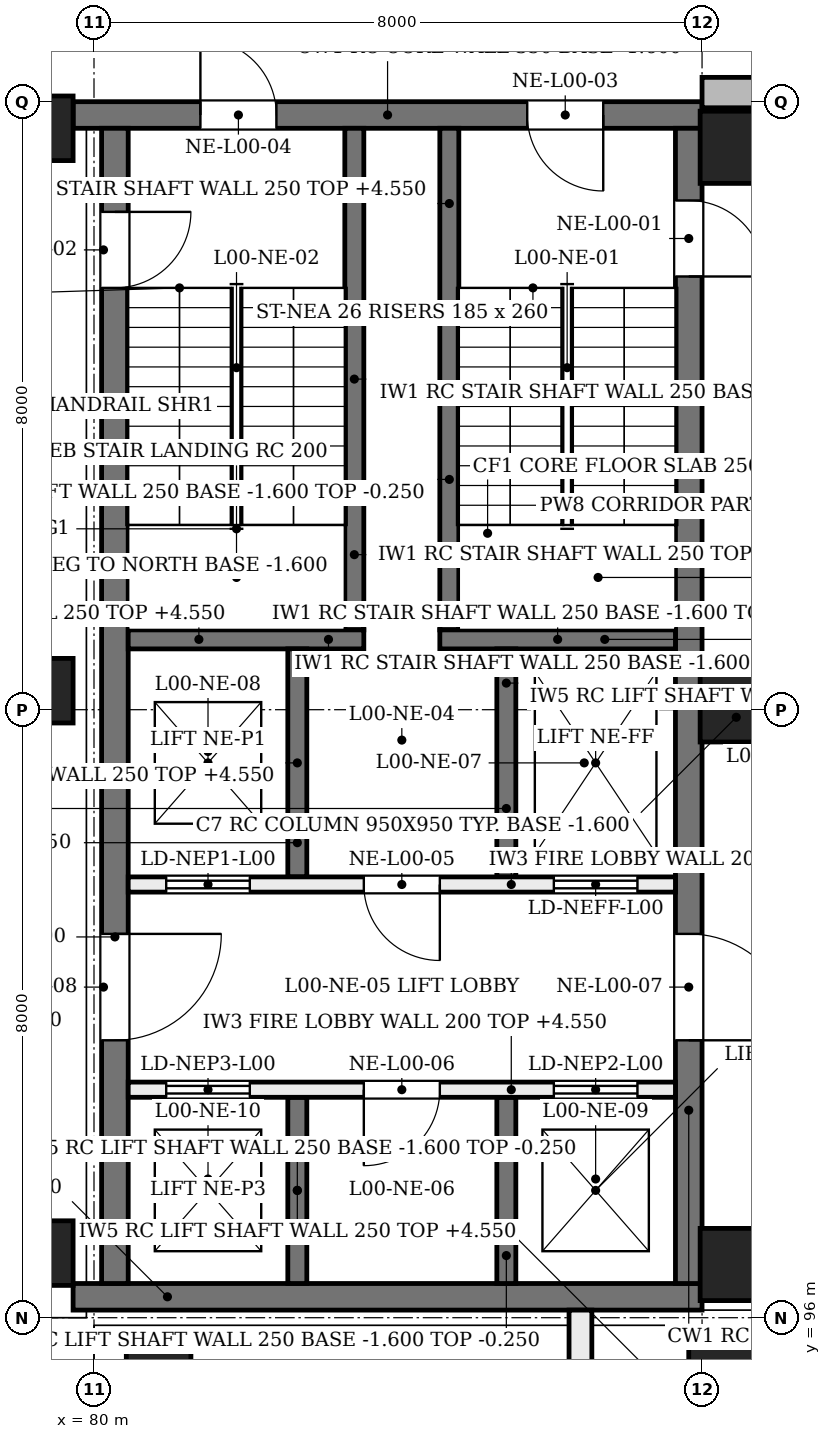
"""IFC4 building model, lengths in metres.
Left out: names, types, materials, properties, quantities, classifications, styles, units other than length and angle.
Written with IfcOpenShell. Run it as: python <this file> out.ifc"""

import sys

from ifc_helpers import new_model, si_unit, direction, frame, frame_2d, origin, origin_2d, place, context, subcontext, project, spatial, rectangle, extrude, element, fill, save


model = new_model("IFC4")
c1 = context("Model", 3, precision=1e-05, world=origin(), true_north=direction((0.0, 1.0)))
c2 = subcontext(c1, "Body", "Model", "MODEL_VIEW")
j1 = project(units=[si_unit("LENGTHUNIT", "METRE"), si_unit("PLANEANGLEUNIT", "RADIAN")], contexts=[c1])
p1 = place(None, origin())
s1 = spatial("IfcSite", under=j1, at=p1, CompositionType="ELEMENT")
p2 = place(p1, origin())
s2 = spatial("IfcBuilding", under=s1, at=p2, CompositionType="ELEMENT")
p3 = place(p2, origin())
s3 = spatial("IfcBuildingStorey", under=s2, at=p3, CompositionType="ELEMENT", Elevation=0.0)
p4 = place(p3, frame((79.725, 96.275, -1.6), z_axis=(0.0, 0.0, 1.0), x_axis=(1.0, 0.0, 0.0)))
e1 = element("IfcWall", 1, at=p4, inside=s3, PredefinedType="SHEAR", context=c2, shape_type="SweptSolid", body=[
    extrude(rectangle(XDim=8.275, YDim=0.35, at=frame_2d((4.137, 0.0))), origin(), (0.0, 0.0, 1.0), 6.18),
])
p5 = place(p3, frame((79.725, 111.825, -1.6), z_axis=(0.0, 0.0, 1.0), x_axis=(1.0, 0.0, 0.0)))
e2 = element("IfcWall", 2, at=p5, inside=s3, PredefinedType="SHEAR", context=c2, shape_type="SweptSolid", body=[
    extrude(rectangle(XDim=8.275, YDim=0.35, at=frame_2d((4.137, 0.0))), origin(), (0.0, 0.0, 1.0), 6.18),
])
p6 = place(p5, frame((5.975, 0.0, 1.6)))
e3 = element("IfcOpeningElement", 3, at=p6, cuts=e2, PredefinedType="OPENING", context=c2, shape_type="SweptSolid", body=[
    extrude(rectangle(XDim=1.0, YDim=2.1, at=frame_2d((0.5, 1.05))), frame((0.0, 0.185, 0.0), z_axis=(0.0, -1.0, 0.0), x_axis=(1.0, 0.0, 0.0)), (0.0, 0.0, 1.0), 0.37),
])
p7 = place(p5, frame((1.675, 0.0, 1.6)))
e4 = element("IfcOpeningElement", 4, at=p7, cuts=e2, PredefinedType="OPENING", context=c2, shape_type="SweptSolid", body=[
    extrude(rectangle(XDim=1.0, YDim=2.1, at=frame_2d((0.5, 1.05))), frame((0.0, 0.185, 0.0), z_axis=(0.0, -1.0, 0.0), x_axis=(1.0, 0.0, 0.0)), (0.0, 0.0, 1.0), 0.37),
])
p8 = place(p3, frame((80.275, 96.45, -1.6), z_axis=(0.0, 0.0, 1.0), x_axis=(0.0, 1.0, 0.0)))
e5 = element("IfcWall", 5, at=p8, inside=s3, PredefinedType="SHEAR", context=c2, shape_type="SweptSolid", body=[
    extrude(rectangle(XDim=15.2, YDim=0.35, at=frame_2d((7.6, 0.0))), origin(), (0.0, 0.0, 1.0), 6.18),
])
p9 = place(p8, frame((13.1, 0.0, 1.6)))
e6 = element("IfcOpeningElement", 6, at=p9, cuts=e5, PredefinedType="OPENING", context=c2, shape_type="SweptSolid", body=[
    extrude(rectangle(XDim=1.0, YDim=2.1, at=frame_2d((0.5, 1.05))), frame((0.0, 0.185, 0.0), z_axis=(0.0, -1.0, 0.0), x_axis=(1.0, 0.0, 0.0)), (0.0, 0.0, 1.0), 0.37),
])
p10 = place(p8, frame((3.2, 0.0, 1.6)))
e7 = element("IfcOpeningElement", 7, at=p10, cuts=e5, PredefinedType="OPENING", context=c2, shape_type="SweptSolid", body=[
    extrude(rectangle(XDim=1.4, YDim=2.1, at=frame_2d((0.7, 1.05))), frame((0.0, 0.185, 0.0), z_axis=(0.0, -1.0, 0.0), x_axis=(1.0, 0.0, 0.0)), (0.0, 0.0, 1.0), 0.37),
])
p11 = place(p3, frame((87.825, 96.45, -1.6), z_axis=(0.0, 0.0, 1.0), x_axis=(0.0, 1.0, 0.0)))
e8 = element("IfcWall", 8, at=p11, inside=s3, PredefinedType="SHEAR", context=c2, shape_type="SweptSolid", body=[
    extrude(rectangle(XDim=15.2, YDim=0.35, at=frame_2d((7.6, 0.0))), origin(), (0.0, 0.0, 1.0), 6.18),
])
p12 = place(p11, frame((13.25, 0.0, 1.6)))
e9 = element("IfcOpeningElement", 9, at=p12, cuts=e8, PredefinedType="OPENING", context=c2, shape_type="SweptSolid", body=[
    extrude(rectangle(XDim=1.0, YDim=2.1, at=frame_2d((0.5, 1.05))), frame((0.0, 0.185, 0.0), z_axis=(0.0, -1.0, 0.0), x_axis=(1.0, 0.0, 0.0)), (0.0, 0.0, 1.0), 0.37),
])
p13 = place(p11, frame((3.2, 0.0, 1.6)))
e10 = element("IfcOpeningElement", 10, at=p13, cuts=e8, PredefinedType="OPENING", context=c2, shape_type="SweptSolid", body=[
    extrude(rectangle(XDim=1.4, YDim=2.1, at=frame_2d((0.7, 1.05))), frame((0.0, 0.185, 0.0), z_axis=(0.0, -1.0, 0.0), x_axis=(1.0, 0.0, 0.0)), (0.0, 0.0, 1.0), 0.37),
])
for number, where, z_axis, x_axis in (
    (11, (88.45, 96.7, -1.6), (0.0, 0.0, 1.0), (1.0, 0.0, 0.0)),
    (12, (88.45, 104.05, -1.6), (0.0, 0.0, 1.0), (1.0, 0.0, 0.0)),
    (13, (88.45, 111.4, -1.6), (0.0, 0.0, 1.0), (1.0, 0.0, 0.0)),
):
    element("IfcColumn", number, at=place(p3, frame(where, z_axis=z_axis, x_axis=x_axis)), inside=s3, PredefinedType="COLUMN", context=c2, shape_type="SweptSolid", body=[
        extrude(rectangle(XDim=0.95, YDim=0.95, at=origin_2d()), origin(), (0.0, 0.0, 1.0), 6.4),
    ])
for number, where, z_axis, x_axis in (
    (14, (79.3, 96.267, -1.6), (0.0, 0.204, 0.979), (-1.0, 0.0, 0.0)),
    (15, (79.3, 103.667, -1.6), (0.0, 0.204, 0.979), (-1.0, 0.0, 0.0)),
    (16, (79.3, 111.067, -1.6), (0.0, 0.204, 0.979), (-1.0, 0.0, 0.0)),
    (17, (80.267, 95.3, -1.6), (0.204, 0.0, 0.979), (0.0, 1.0, 0.0)),
    (18, (87.667, 95.3, -1.6), (0.204, 0.0, 0.979), (0.0, 1.0, 0.0)),
):
    element("IfcColumn", number, at=place(p3, frame(where, z_axis=z_axis, x_axis=x_axis)), inside=s3, PredefinedType="COLUMN", context=c2, shape_type="SweptSolid", body=[
        extrude(rectangle(XDim=0.85, YDim=0.85, at=origin_2d()), origin(), (0.0, 0.0, 1.0), 6.538),
    ])
p14 = place(p3, frame((88.0, 112.12, 0.0), z_axis=(0.0, 0.0, 1.0), x_axis=(1.0, 0.0, 0.0)))
e19 = element("IfcWall", 19, at=p14, inside=s3, PredefinedType="SOLIDWALL", context=c2, shape_type="SweptSolid", body=[
    extrude(rectangle(XDim=8.0, YDim=0.4, at=frame_2d((4.0, 0.0))), origin(), (0.0, 0.0, 1.0), 3.9),
])
p15 = place(p14, frame((0.733, 0.0, 1.9)))
e20 = element("IfcOpeningElement", 20, at=p15, cuts=e19, PredefinedType="OPENING", context=c2, shape_type="SweptSolid", body=[
    extrude(rectangle(XDim=1.2, YDim=1.5, at=frame_2d((0.6, 0.75))), frame((0.0, 0.21, 0.0), z_axis=(0.0, -1.0, 0.0), x_axis=(1.0, 0.0, 0.0)), (0.0, 0.0, 1.0), 0.42),
])
p16 = place(p14, frame((3.4, 0.0, 1.9)))
e21 = element("IfcOpeningElement", 21, at=p16, cuts=e19, PredefinedType="OPENING", context=c2, shape_type="SweptSolid", body=[
    extrude(rectangle(XDim=1.2, YDim=1.5, at=frame_2d((0.6, 0.75))), frame((0.0, 0.21, 0.0), z_axis=(0.0, -1.0, 0.0), x_axis=(1.0, 0.0, 0.0)), (0.0, 0.0, 1.0), 0.42),
])
p17 = place(p14, frame((6.067, 0.0, 1.9)))
e22 = element("IfcOpeningElement", 22, at=p17, cuts=e19, PredefinedType="OPENING", context=c2, shape_type="SweptSolid", body=[
    extrude(rectangle(XDim=1.2, YDim=1.5, at=frame_2d((0.6, 0.75))), frame((0.0, 0.21, 0.0), z_axis=(0.0, -1.0, 0.0), x_axis=(1.0, 0.0, 0.0)), (0.0, 0.0, 1.0), 0.42),
])
p18 = place(p3, frame((84.675, 111.65, 0.0), z_axis=(0.0, 0.0, 1.0), x_axis=(0.0, -1.0, 0.0)))
e23 = element("IfcWall", 23, at=p18, inside=s3, PredefinedType="SOLIDWALL", context=c2, shape_type="SweptSolid", body=[
    extrude(rectangle(XDim=6.6, YDim=0.25, at=frame_2d((3.3, 0.0))), origin(), (0.0, 0.0, 1.0), 4.55),
])
p19 = place(p3, frame((84.675, 111.65, -1.6), z_axis=(0.0, 0.0, 1.0), x_axis=(0.0, -1.0, 0.0)))
e24 = element("IfcWall", 24, at=p19, inside=s3, PredefinedType="SOLIDWALL", context=c2, shape_type="SweptSolid", body=[
    extrude(rectangle(XDim=6.6, YDim=0.25, at=frame_2d((3.3, 0.0))), origin(), (0.0, 0.0, 1.0), 1.35),
])
p20 = place(p3, frame((83.425, 111.65, 0.0), z_axis=(0.0, 0.0, 1.0), x_axis=(0.0, -1.0, 0.0)))
e25 = element("IfcWall", 25, at=p20, inside=s3, PredefinedType="SOLIDWALL", context=c2, shape_type="SweptSolid", body=[
    extrude(rectangle(XDim=6.6, YDim=0.25, at=frame_2d((3.3, 0.0))), origin(), (0.0, 0.0, 1.0), 4.55),
])
p21 = place(p3, frame((83.425, 111.65, -1.6), z_axis=(0.0, 0.0, 1.0), x_axis=(0.0, -1.0, 0.0)))
e26 = element("IfcWall", 26, at=p21, inside=s3, PredefinedType="SOLIDWALL", context=c2, shape_type="SweptSolid", body=[
    extrude(rectangle(XDim=6.6, YDim=0.25, at=frame_2d((3.3, 0.0))), origin(), (0.0, 0.0, 1.0), 1.35),
])
p22 = place(p3, frame((87.65, 104.925, 0.0), z_axis=(0.0, 0.0, 1.0), x_axis=(-1.0, 0.0, 0.0)))
e27 = element("IfcWall", 27, at=p22, inside=s3, PredefinedType="SOLIDWALL", context=c2, shape_type="SweptSolid", body=[
    extrude(rectangle(XDim=3.1, YDim=0.25, at=frame_2d((1.55, 0.0))), origin(), (0.0, 0.0, 1.0), 4.55),
])
p23 = place(p3, frame((87.65, 104.925, -1.6), z_axis=(0.0, 0.0, 1.0), x_axis=(-1.0, 0.0, 0.0)))
e28 = element("IfcWall", 28, at=p23, inside=s3, PredefinedType="SOLIDWALL", context=c2, shape_type="SweptSolid", body=[
    extrude(rectangle(XDim=3.1, YDim=0.25, at=frame_2d((1.55, 0.0))), origin(), (0.0, 0.0, 1.0), 1.35),
])
p24 = place(p3, frame((83.55, 104.925, 0.0), z_axis=(0.0, 0.0, 1.0), x_axis=(-1.0, 0.0, 0.0)))
e29 = element("IfcWall", 29, at=p24, inside=s3, PredefinedType="SOLIDWALL", context=c2, shape_type="SweptSolid", body=[
    extrude(rectangle(XDim=3.1, YDim=0.25, at=frame_2d((1.55, 0.0))), origin(), (0.0, 0.0, 1.0), 4.55),
])
p25 = place(p3, frame((83.55, 104.925, -1.6), z_axis=(0.0, 0.0, 1.0), x_axis=(-1.0, 0.0, 0.0)))
e30 = element("IfcWall", 30, at=p25, inside=s3, PredefinedType="SOLIDWALL", context=c2, shape_type="SweptSolid", body=[
    extrude(rectangle(XDim=3.1, YDim=0.25, at=frame_2d((1.55, 0.0))), origin(), (0.0, 0.0, 1.0), 1.35),
])
p26 = place(p3, frame((85.425, 104.8, 0.0), z_axis=(0.0, 0.0, 1.0), x_axis=(0.0, -1.0, 0.0)))
e31 = element("IfcWall", 31, at=p26, inside=s3, PredefinedType="SOLIDWALL", context=c2, shape_type="SweptSolid", body=[
    extrude(rectangle(XDim=3.0, YDim=0.25, at=frame_2d((1.5, 0.0))), origin(), (0.0, 0.0, 1.0), 4.55),
])
p27 = place(p3, frame((85.425, 104.8, -1.6), z_axis=(0.0, 0.0, 1.0), x_axis=(0.0, -1.0, 0.0)))
e32 = element("IfcWall", 32, at=p27, inside=s3, PredefinedType="SOLIDWALL", context=c2, shape_type="SweptSolid", body=[
    extrude(rectangle(XDim=3.0, YDim=0.25, at=frame_2d((1.5, 0.0))), origin(), (0.0, 0.0, 1.0), 1.35),
])
p28 = place(p3, frame((85.425, 98.9, 0.0), z_axis=(0.0, 0.0, 1.0), x_axis=(0.0, -1.0, 0.0)))
e33 = element("IfcWall", 33, at=p28, inside=s3, PredefinedType="SOLIDWALL", context=c2, shape_type="SweptSolid", body=[
    extrude(rectangle(XDim=2.45, YDim=0.25, at=frame_2d((1.225, 0.0))), origin(), (0.0, 0.0, 1.0), 4.55),
])
p29 = place(p3, frame((85.425, 98.9, -1.6), z_axis=(0.0, 0.0, 1.0), x_axis=(0.0, -1.0, 0.0)))
e34 = element("IfcWall", 34, at=p29, inside=s3, PredefinedType="SOLIDWALL", context=c2, shape_type="SweptSolid", body=[
    extrude(rectangle(XDim=2.45, YDim=0.25, at=frame_2d((1.225, 0.0))), origin(), (0.0, 0.0, 1.0), 1.35),
])
p30 = place(p3, frame((82.675, 104.8, 0.0), z_axis=(0.0, 0.0, 1.0), x_axis=(0.0, -1.0, 0.0)))
e35 = element("IfcWall", 35, at=p30, inside=s3, PredefinedType="SOLIDWALL", context=c2, shape_type="SweptSolid", body=[
    extrude(rectangle(XDim=3.0, YDim=0.25, at=frame_2d((1.5, 0.0))), origin(), (0.0, 0.0, 1.0), 4.55),
])
p31 = place(p3, frame((82.675, 104.8, -1.6), z_axis=(0.0, 0.0, 1.0), x_axis=(0.0, -1.0, 0.0)))
e36 = element("IfcWall", 36, at=p31, inside=s3, PredefinedType="SOLIDWALL", context=c2, shape_type="SweptSolid", body=[
    extrude(rectangle(XDim=3.0, YDim=0.25, at=frame_2d((1.5, 0.0))), origin(), (0.0, 0.0, 1.0), 1.35),
])
p32 = place(p3, frame((82.675, 98.9, 0.0), z_axis=(0.0, 0.0, 1.0), x_axis=(0.0, -1.0, 0.0)))
e37 = element("IfcWall", 37, at=p32, inside=s3, PredefinedType="SOLIDWALL", context=c2, shape_type="SweptSolid", body=[
    extrude(rectangle(XDim=2.45, YDim=0.25, at=frame_2d((1.225, 0.0))), origin(), (0.0, 0.0, 1.0), 4.55),
])
p33 = place(p3, frame((82.675, 98.9, -1.6), z_axis=(0.0, 0.0, 1.0), x_axis=(0.0, -1.0, 0.0)))
e38 = element("IfcWall", 38, at=p33, inside=s3, PredefinedType="SOLIDWALL", context=c2, shape_type="SweptSolid", body=[
    extrude(rectangle(XDim=2.45, YDim=0.25, at=frame_2d((1.225, 0.0))), origin(), (0.0, 0.0, 1.0), 1.35),
])
p34 = place(p3, frame((87.65, 101.7, 0.0), z_axis=(0.0, 0.0, 1.0), x_axis=(-1.0, 0.0, 0.0)))
e39 = element("IfcWall", 39, at=p34, inside=s3, PredefinedType="SOLIDWALL", context=c2, shape_type="SweptSolid", body=[
    extrude(rectangle(XDim=7.2, YDim=0.2, at=frame_2d((3.6, 0.0))), origin(), (0.0, 0.0, 1.0), 4.55),
])
p35 = place(p34, frame((0.5, 0.0, 0.0)))
e40 = element("IfcOpeningElement", 40, at=p35, cuts=e39, PredefinedType="OPENING", context=c2, shape_type="SweptSolid", body=[
    extrude(rectangle(XDim=1.1, YDim=2.1, at=frame_2d((0.55, 1.05))), frame((0.0, 0.11, 0.0), z_axis=(0.0, -1.0, 0.0), x_axis=(1.0, 0.0, 0.0)), (0.0, 0.0, 1.0), 0.22),
])
p36 = place(p34, frame((5.6, 0.0, 0.0)))
e41 = element("IfcOpeningElement", 41, at=p36, cuts=e39, PredefinedType="OPENING", context=c2, shape_type="SweptSolid", body=[
    extrude(rectangle(XDim=1.1, YDim=2.1, at=frame_2d((0.55, 1.05))), frame((0.0, 0.11, 0.0), z_axis=(0.0, -1.0, 0.0), x_axis=(1.0, 0.0, 0.0)), (0.0, 0.0, 1.0), 0.22),
])
p37 = place(p34, frame((3.1, 0.0, 0.0)))
e42 = element("IfcOpeningElement", 42, at=p37, cuts=e39, PredefinedType="OPENING", context=c2, shape_type="SweptSolid", body=[
    extrude(rectangle(XDim=1.0, YDim=2.1, at=frame_2d((0.5, 1.05))), frame((0.0, 0.11, 0.0), z_axis=(0.0, -1.0, 0.0), x_axis=(1.0, 0.0, 0.0)), (0.0, 0.0, 1.0), 0.22),
])
p38 = place(p3, frame((87.65, 99.0, 0.0), z_axis=(0.0, 0.0, 1.0), x_axis=(-1.0, 0.0, 0.0)))
e43 = element("IfcWall", 43, at=p38, inside=s3, PredefinedType="SOLIDWALL", context=c2, shape_type="SweptSolid", body=[
    extrude(rectangle(XDim=7.2, YDim=0.2, at=frame_2d((3.6, 0.0))), origin(), (0.0, 0.0, 1.0), 4.55),
])
p39 = place(p38, frame((0.5, 0.0, 0.0)))
e44 = element("IfcOpeningElement", 44, at=p39, cuts=e43, PredefinedType="OPENING", context=c2, shape_type="SweptSolid", body=[
    extrude(rectangle(XDim=1.1, YDim=2.1, at=frame_2d((0.55, 1.05))), frame((0.0, 0.11, 0.0), z_axis=(0.0, -1.0, 0.0), x_axis=(1.0, 0.0, 0.0)), (0.0, 0.0, 1.0), 0.22),
])
p40 = place(p38, frame((5.6, 0.0, 0.0)))
e45 = element("IfcOpeningElement", 45, at=p40, cuts=e43, PredefinedType="OPENING", context=c2, shape_type="SweptSolid", body=[
    extrude(rectangle(XDim=1.1, YDim=2.1, at=frame_2d((0.55, 1.05))), frame((0.0, 0.11, 0.0), z_axis=(0.0, -1.0, 0.0), x_axis=(1.0, 0.0, 0.0)), (0.0, 0.0, 1.0), 0.22),
])
p41 = place(p38, frame((3.1, 0.0, 0.0)))
e46 = element("IfcOpeningElement", 46, at=p41, cuts=e43, PredefinedType="OPENING", context=c2, shape_type="SweptSolid", body=[
    extrude(rectangle(XDim=1.0, YDim=2.1, at=frame_2d((0.5, 1.05))), frame((0.0, 0.11, 0.0), z_axis=(0.0, -1.0, 0.0), x_axis=(1.0, 0.0, 0.0)), (0.0, 0.0, 1.0), 0.22),
])
p42 = place(p3, frame((86.4, 91.95, 0.0), z_axis=(0.0, 0.0, 1.0), x_axis=(0.0, 1.0, 0.0)))
e47 = element("IfcWall", 47, at=p42, inside=s3, PredefinedType="PARTITIONING", context=c2, shape_type="SweptSolid", body=[
    extrude(rectangle(XDim=4.15, YDim=0.3, at=frame_2d((2.075, 0.0))), origin(), (0.0, 0.0, 1.0), 3.88),
])
p43 = place(p42, frame((1.3, 0.0, 0.0)))
e48 = element("IfcOpeningElement", 48, at=p43, cuts=e47, PredefinedType="OPENING", context=c2, shape_type="SweptSolid", body=[
    extrude(rectangle(XDim=1.2, YDim=2.2, at=frame_2d((0.6, 1.1))), frame((0.0, 0.16, 0.0), z_axis=(0.0, -1.0, 0.0), x_axis=(1.0, 0.0, 0.0)), (0.0, 0.0, 1.0), 0.32),
])
p44 = place(p12, frame((1.0, 0.0, 0.0), z_axis=(0.0, 0.0, 1.0), x_axis=(-1.0, 0.0, 0.0)))
e49 = element("IfcDoor", 49, at=p44, inside=s3, OperationType="SINGLE_SWING_LEFT", PredefinedType="DOOR", context=c2, shape_type="SweptSolid", body=[
    extrude(rectangle(XDim=1.0, YDim=2.1, at=frame_2d((0.5, 1.05))), frame((0.0, 0.025, 0.0), z_axis=(0.0, -1.0, 0.0), x_axis=(1.0, 0.0, 0.0)), (0.0, 0.0, 1.0), 0.05),
])
fill(e9, e49)
p45 = place(p9, origin())
e50 = element("IfcDoor", 50, at=p45, inside=s3, OperationType="SINGLE_SWING_RIGHT", PredefinedType="DOOR", context=c2, shape_type="SweptSolid", body=[
    extrude(rectangle(XDim=1.0, YDim=2.1, at=frame_2d((0.5, 1.05))), frame((0.0, 0.025, 0.0), z_axis=(0.0, -1.0, 0.0), x_axis=(1.0, 0.0, 0.0)), (0.0, 0.0, 1.0), 0.05),
])
fill(e6, e50)
p46 = place(p6, origin())
e51 = element("IfcDoor", 51, at=p46, inside=s3, OperationType="SINGLE_SWING_RIGHT", PredefinedType="DOOR", context=c2, shape_type="SweptSolid", body=[
    extrude(rectangle(XDim=1.0, YDim=2.1, at=frame_2d((0.5, 1.05))), frame((0.0, 0.025, 0.0), z_axis=(0.0, -1.0, 0.0), x_axis=(1.0, 0.0, 0.0)), (0.0, 0.0, 1.0), 0.05),
])
fill(e3, e51)
p47 = place(p7, origin())
e52 = element("IfcDoor", 52, at=p47, inside=s3, OperationType="SINGLE_SWING_LEFT", PredefinedType="DOOR", context=c2, shape_type="SweptSolid", body=[
    extrude(rectangle(XDim=1.0, YDim=2.1, at=frame_2d((0.5, 1.05))), frame((0.0, 0.025, 0.0), z_axis=(0.0, -1.0, 0.0), x_axis=(1.0, 0.0, 0.0)), (0.0, 0.0, 1.0), 0.05),
])
fill(e4, e52)
p48 = place(p35, origin())
e53 = element("IfcDoor", 53, at=p48, inside=s3, OperationType="DOUBLE_DOOR_SLIDING", PredefinedType="DOOR", context=c2, shape_type="SweptSolid", body=[
    extrude(rectangle(XDim=1.1, YDim=2.1, at=frame_2d((0.55, 1.05))), frame((0.0, 0.025, 0.0), z_axis=(0.0, -1.0, 0.0), x_axis=(1.0, 0.0, 0.0)), (0.0, 0.0, 1.0), 0.05),
])
fill(e40, e53)
p49 = place(p36, origin())
e54 = element("IfcDoor", 54, at=p49, inside=s3, OperationType="DOUBLE_DOOR_SLIDING", PredefinedType="DOOR", context=c2, shape_type="SweptSolid", body=[
    extrude(rectangle(XDim=1.1, YDim=2.1, at=frame_2d((0.55, 1.05))), frame((0.0, 0.025, 0.0), z_axis=(0.0, -1.0, 0.0), x_axis=(1.0, 0.0, 0.0)), (0.0, 0.0, 1.0), 0.05),
])
fill(e41, e54)
p50 = place(p39, frame((1.1, 0.0, 0.0), z_axis=(0.0, 0.0, 1.0), x_axis=(-1.0, 0.0, 0.0)))
e55 = element("IfcDoor", 55, at=p50, inside=s3, OperationType="DOUBLE_DOOR_SLIDING", PredefinedType="DOOR", context=c2, shape_type="SweptSolid", body=[
    extrude(rectangle(XDim=1.1, YDim=2.1, at=frame_2d((0.55, 1.05))), frame((0.0, 0.025, 0.0), z_axis=(0.0, -1.0, 0.0), x_axis=(1.0, 0.0, 0.0)), (0.0, 0.0, 1.0), 0.05),
])
fill(e44, e55)
p51 = place(p40, frame((1.1, 0.0, 0.0), z_axis=(0.0, 0.0, 1.0), x_axis=(-1.0, 0.0, 0.0)))
e56 = element("IfcDoor", 56, at=p51, inside=s3, OperationType="DOUBLE_DOOR_SLIDING", PredefinedType="DOOR", context=c2, shape_type="SweptSolid", body=[
    extrude(rectangle(XDim=1.1, YDim=2.1, at=frame_2d((0.55, 1.05))), frame((0.0, 0.025, 0.0), z_axis=(0.0, -1.0, 0.0), x_axis=(1.0, 0.0, 0.0)), (0.0, 0.0, 1.0), 0.05),
])
fill(e45, e56)
p52 = place(p37, origin())
e57 = element("IfcDoor", 57, at=p52, inside=s3, OperationType="SINGLE_SWING_LEFT", PredefinedType="DOOR", context=c2, shape_type="SweptSolid", body=[
    extrude(rectangle(XDim=1.0, YDim=2.1, at=frame_2d((0.5, 1.05))), frame((0.0, 0.025, 0.0), z_axis=(0.0, -1.0, 0.0), x_axis=(1.0, 0.0, 0.0)), (0.0, 0.0, 1.0), 0.05),
])
fill(e42, e57)
p53 = place(p41, frame((1.0, 0.0, 0.0), z_axis=(0.0, 0.0, 1.0), x_axis=(-1.0, 0.0, 0.0)))
e58 = element("IfcDoor", 58, at=p53, inside=s3, OperationType="SINGLE_SWING_RIGHT", PredefinedType="DOOR", context=c2, shape_type="SweptSolid", body=[
    extrude(rectangle(XDim=1.0, YDim=2.1, at=frame_2d((0.5, 1.05))), frame((0.0, 0.025, 0.0), z_axis=(0.0, -1.0, 0.0), x_axis=(1.0, 0.0, 0.0)), (0.0, 0.0, 1.0), 0.05),
])
fill(e46, e58)
p54 = place(p13, frame((1.4, 0.0, 0.0), z_axis=(0.0, 0.0, 1.0), x_axis=(-1.0, 0.0, 0.0)))
e59 = element("IfcDoor", 59, at=p54, inside=s3, OperationType="SINGLE_SWING_LEFT", PredefinedType="DOOR", context=c2, shape_type="SweptSolid", body=[
    extrude(rectangle(XDim=1.4, YDim=2.1, at=frame_2d((0.7, 1.05))), frame((0.0, 0.025, 0.0), z_axis=(0.0, -1.0, 0.0), x_axis=(1.0, 0.0, 0.0)), (0.0, 0.0, 1.0), 0.05),
])
fill(e10, e59)
p55 = place(p10, origin())
e60 = element("IfcDoor", 60, at=p55, inside=s3, OperationType="SINGLE_SWING_RIGHT", PredefinedType="DOOR", context=c2, shape_type="SweptSolid", body=[
    extrude(rectangle(XDim=1.4, YDim=2.1, at=frame_2d((0.7, 1.05))), frame((0.0, 0.025, 0.0), z_axis=(0.0, -1.0, 0.0), x_axis=(1.0, 0.0, 0.0)), (0.0, 0.0, 1.0), 0.05),
])
fill(e7, e60)
save(model, sys.argv[1])
